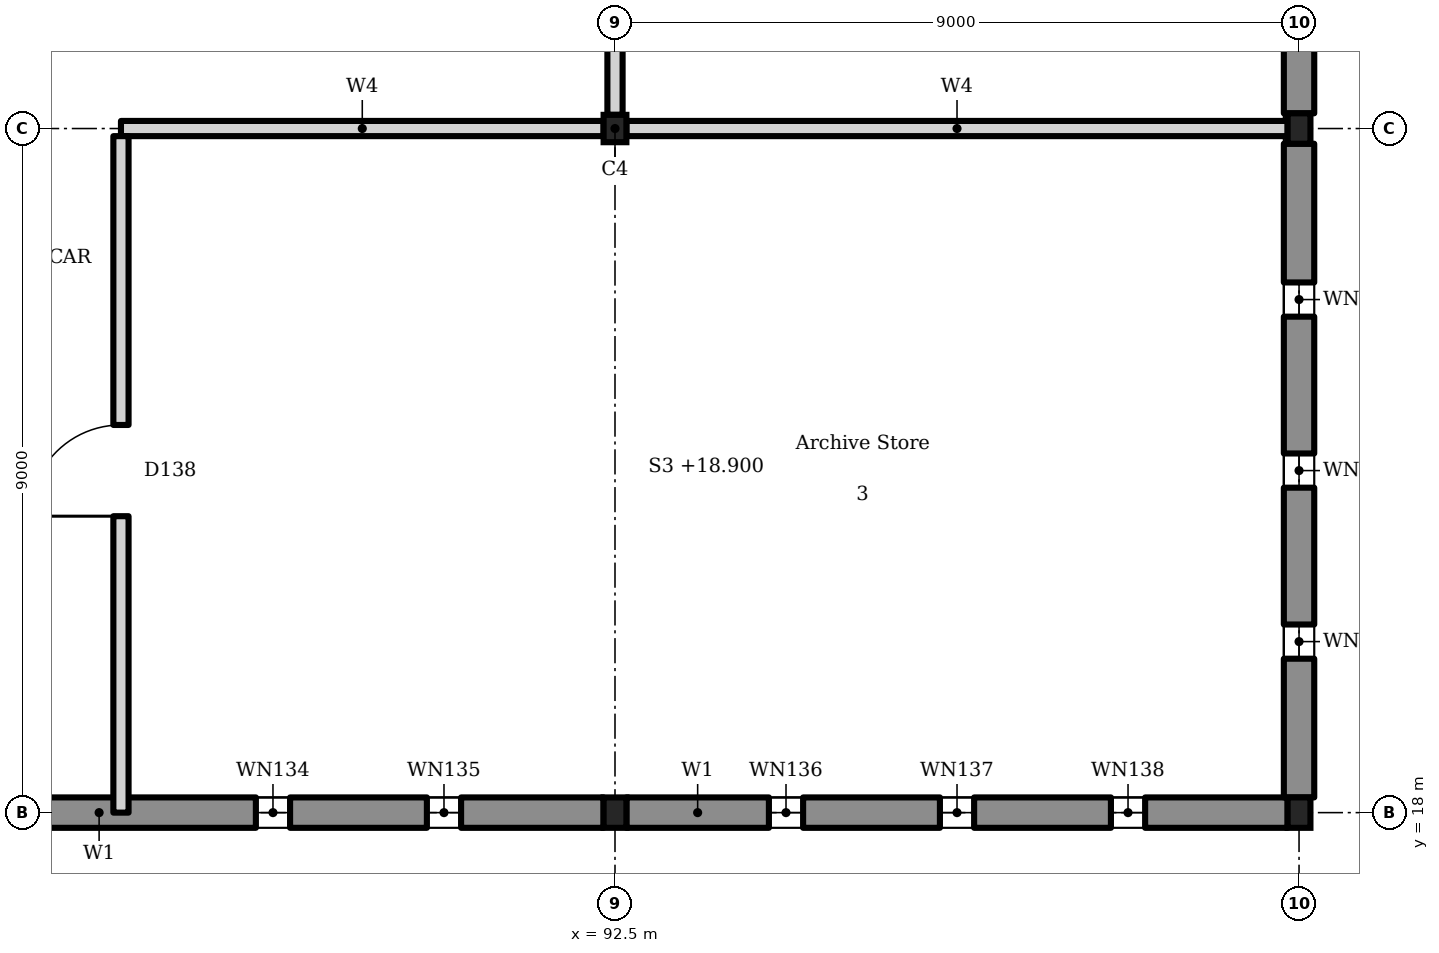
"""IFC4 building model, lengths in metres.
Left out: names, types, materials, properties, quantities, classifications, styles, units other than length and angle.
Written with IfcOpenShell. Run it as: python <this file> out.ifc"""

import sys

from ifc_helpers import new_model, si_unit, direction, frame, frame_2d, origin, origin_2d, place, context, subcontext, project, spatial, rectangle, i_section, extrude, element, fill, save


model = new_model("IFC4")
c1 = context("Model", 3, precision=1e-05, world=origin(), true_north=direction((0.0, 1.0)))
c2 = subcontext(c1, "Body", "Model", "MODEL_VIEW")
j1 = project(units=[si_unit("LENGTHUNIT", "METRE"), si_unit("PLANEANGLEUNIT", "RADIAN")], contexts=[c1])
p1 = place(None, origin())
s1 = spatial("IfcSite", under=j1, at=p1, CompositionType="ELEMENT")
p2 = place(p1, origin())
s2 = spatial("IfcBuilding", under=s1, at=p2, CompositionType="ELEMENT")
p3 = place(p2, frame((0.0, 0.0, 18.9)))
s3 = spatial("IfcBuildingStorey", under=s2, at=p3, CompositionType="ELEMENT", Elevation=18.9)
for number, where, z_axis, x_axis in (
    (1, (92.5, 18.0, 0.0), (0.0, 0.0, 1.0), (1.0, 0.0, 0.0)),
    (2, (101.5, 18.0, 0.0), (0.0, 0.0, 1.0), (1.0, 0.0, 0.0)),
):
    element("IfcColumn", number, at=place(p3, frame(where, z_axis=z_axis, x_axis=x_axis)), inside=s3, PredefinedType="COLUMN", context=c2, shape_type="SweptSolid", body=[
        extrude(i_section(OverallWidth=0.3, OverallDepth=0.4, WebThickness=0.013, FlangeThickness=0.024, FilletRadius=0.027, at=origin_2d()), origin(), (0.0, 0.0, 1.0), 4.5),
    ])
p4 = place(p3, frame((92.5, 27.0, 0.0), z_axis=(0.0, 0.0, 1.0), x_axis=(1.0, 0.0, 0.0)))
e3 = element("IfcColumn", 3, at=p4, inside=s3, PredefinedType="COLUMN", context=c2, shape_type="SweptSolid", body=[
    extrude(i_section(OverallWidth=0.3, OverallDepth=0.36, WebThickness=0.012, FlangeThickness=0.022, FilletRadius=0.027, at=origin_2d()), origin(), (0.0, 0.0, 1.0), 4.5),
])
p5 = place(p3, frame((101.5, 27.0, 0.0), z_axis=(0.0, 0.0, 1.0), x_axis=(1.0, 0.0, 0.0)))
e4 = element("IfcColumn", 4, at=p5, inside=s3, PredefinedType="COLUMN", context=c2, shape_type="SweptSolid", body=[
    extrude(i_section(OverallWidth=0.3, OverallDepth=0.4, WebThickness=0.013, FlangeThickness=0.024, FilletRadius=0.027, at=origin_2d()), origin(), (0.0, 0.0, 1.0), 4.5),
])
p6 = place(p3, frame((83.65, 18.0, 0.0), z_axis=(0.0, 0.0, 1.0), x_axis=(1.0, 0.0, 0.0)))
e5 = element("IfcWall", 5, at=p6, inside=s3, PredefinedType="SOLIDWALL", context=c2, shape_type="SweptSolid", body=[
    extrude(rectangle(XDim=8.7, YDim=0.4, at=frame_2d((4.35, 0.0))), origin(), (0.0, 0.0, 1.0), 4.5),
])
p7 = place(p6, frame((4.125, 0.0, 0.9)))
e6 = element("IfcOpeningElement", 6, at=p7, cuts=e5, PredefinedType="OPENING", context=c2, shape_type="SweptSolid", body=[
    extrude(rectangle(XDim=0.45, YDim=2.6, at=frame_2d((0.225, 1.3))), frame((0.0, 0.21, 0.0), z_axis=(0.0, -1.0, 0.0), x_axis=(1.0, 0.0, 0.0)), (0.0, 0.0, 1.0), 0.42),
])
p8 = place(p6, frame((6.375, 0.0, 0.9)))
e7 = element("IfcOpeningElement", 7, at=p8, cuts=e5, PredefinedType="OPENING", context=c2, shape_type="SweptSolid", body=[
    extrude(rectangle(XDim=0.45, YDim=2.6, at=frame_2d((0.225, 1.3))), frame((0.0, 0.21, 0.0), z_axis=(0.0, -1.0, 0.0), x_axis=(1.0, 0.0, 0.0)), (0.0, 0.0, 1.0), 0.42),
])
p9 = place(p3, frame((92.65, 18.0, 0.0), z_axis=(0.0, 0.0, 1.0), x_axis=(1.0, 0.0, 0.0)))
e8 = element("IfcWall", 8, at=p9, inside=s3, PredefinedType="SOLIDWALL", context=c2, shape_type="SweptSolid", body=[
    extrude(rectangle(XDim=8.7, YDim=0.4, at=frame_2d((4.35, 0.0))), origin(), (0.0, 0.0, 1.0), 4.5),
])
p10 = place(p9, frame((1.875, 0.0, 0.9)))
e9 = element("IfcOpeningElement", 9, at=p10, cuts=e8, PredefinedType="OPENING", context=c2, shape_type="SweptSolid", body=[
    extrude(rectangle(XDim=0.45, YDim=2.6, at=frame_2d((0.225, 1.3))), frame((0.0, 0.21, 0.0), z_axis=(0.0, -1.0, 0.0), x_axis=(1.0, 0.0, 0.0)), (0.0, 0.0, 1.0), 0.42),
])
p11 = place(p9, frame((4.125, 0.0, 0.9)))
e10 = element("IfcOpeningElement", 10, at=p11, cuts=e8, PredefinedType="OPENING", context=c2, shape_type="SweptSolid", body=[
    extrude(rectangle(XDim=0.45, YDim=2.6, at=frame_2d((0.225, 1.3))), frame((0.0, 0.21, 0.0), z_axis=(0.0, -1.0, 0.0), x_axis=(1.0, 0.0, 0.0)), (0.0, 0.0, 1.0), 0.42),
])
p12 = place(p9, frame((6.375, 0.0, 0.9)))
e11 = element("IfcOpeningElement", 11, at=p12, cuts=e8, PredefinedType="OPENING", context=c2, shape_type="SweptSolid", body=[
    extrude(rectangle(XDim=0.45, YDim=2.6, at=frame_2d((0.225, 1.3))), frame((0.0, 0.21, 0.0), z_axis=(0.0, -1.0, 0.0), x_axis=(1.0, 0.0, 0.0)), (0.0, 0.0, 1.0), 0.42),
])
p13 = place(p3, frame((101.5, 18.2, 0.0), z_axis=(0.0, 0.0, 1.0), x_axis=(0.0, 1.0, 0.0)))
e12 = element("IfcWall", 12, at=p13, inside=s3, PredefinedType="SOLIDWALL", context=c2, shape_type="SweptSolid", body=[
    extrude(rectangle(XDim=8.6, YDim=0.4, at=frame_2d((4.3, 0.0))), origin(), (0.0, 0.0, 1.0), 4.5),
])
p14 = place(p13, frame((1.825, 0.0, 0.9)))
e13 = element("IfcOpeningElement", 13, at=p14, cuts=e12, PredefinedType="OPENING", context=c2, shape_type="SweptSolid", body=[
    extrude(rectangle(XDim=0.45, YDim=2.6, at=frame_2d((0.225, 1.3))), frame((0.0, 0.21, 0.0), z_axis=(0.0, -1.0, 0.0), x_axis=(1.0, 0.0, 0.0)), (0.0, 0.0, 1.0), 0.42),
])
p15 = place(p13, frame((4.075, 0.0, 0.9)))
e14 = element("IfcOpeningElement", 14, at=p15, cuts=e12, PredefinedType="OPENING", context=c2, shape_type="SweptSolid", body=[
    extrude(rectangle(XDim=0.45, YDim=2.6, at=frame_2d((0.225, 1.3))), frame((0.0, 0.21, 0.0), z_axis=(0.0, -1.0, 0.0), x_axis=(1.0, 0.0, 0.0)), (0.0, 0.0, 1.0), 0.42),
])
p16 = place(p13, frame((6.325, 0.0, 0.9)))
e15 = element("IfcOpeningElement", 15, at=p16, cuts=e12, PredefinedType="OPENING", context=c2, shape_type="SweptSolid", body=[
    extrude(rectangle(XDim=0.45, YDim=2.6, at=frame_2d((0.225, 1.3))), frame((0.0, 0.21, 0.0), z_axis=(0.0, -1.0, 0.0), x_axis=(1.0, 0.0, 0.0)), (0.0, 0.0, 1.0), 0.42),
])
p17 = place(p3, frame((101.5, 27.2, 0.0), z_axis=(0.0, 0.0, 1.0), x_axis=(0.0, 1.0, 0.0)))
e16 = element("IfcWall", 16, at=p17, inside=s3, PredefinedType="SOLIDWALL", context=c2, shape_type="SweptSolid", body=[
    extrude(rectangle(XDim=8.6, YDim=0.4, at=frame_2d((4.3, 0.0))), origin(), (0.0, 0.0, 1.0), 4.5),
])
p18 = place(p3, frame((86.0, 27.0, 0.0), z_axis=(0.0, 0.0, 1.0), x_axis=(1.0, 0.0, 0.0)))
e17 = element("IfcWall", 17, at=p18, inside=s3, PredefinedType="SOLIDWALL", context=c2, shape_type="SweptSolid", body=[
    extrude(rectangle(XDim=6.35, YDim=0.2, at=frame_2d((3.175, 0.0))), origin(), (0.0, 0.0, 1.0), 3.6),
])
p19 = place(p3, frame((92.65, 27.0, 0.0), z_axis=(0.0, 0.0, 1.0), x_axis=(1.0, 0.0, 0.0)))
e18 = element("IfcWall", 18, at=p19, inside=s3, PredefinedType="SOLIDWALL", context=c2, shape_type="SweptSolid", body=[
    extrude(rectangle(XDim=8.7, YDim=0.2, at=frame_2d((4.35, 0.0))), origin(), (0.0, 0.0, 1.0), 3.6),
])
p20 = place(p3, frame((86.0, 18.0, 0.0), z_axis=(0.0, 0.0, 1.0), x_axis=(0.0, 1.0, 0.0)))
e19 = element("IfcWall", 19, at=p20, inside=s3, PredefinedType="SOLIDWALL", context=c2, shape_type="SweptSolid", body=[
    extrude(rectangle(XDim=8.9, YDim=0.2, at=frame_2d((4.45, 0.0))), origin(), (0.0, 0.0, 1.0), 3.6),
])
p21 = place(p20, frame((3.9, 0.0, 0.0)))
e20 = element("IfcOpeningElement", 20, at=p21, cuts=e19, PredefinedType="OPENING", context=c2, shape_type="SweptSolid", body=[
    extrude(rectangle(XDim=1.2, YDim=2.1, at=frame_2d((0.6, 1.05))), frame((0.0, 0.11, 0.0), z_axis=(0.0, -1.0, 0.0), x_axis=(1.0, 0.0, 0.0)), (0.0, 0.0, 1.0), 0.22),
])
p22 = place(p3, frame((92.5, 27.18, 0.0), z_axis=(0.0, 0.0, 1.0), x_axis=(0.0, 1.0, 0.0)))
e21 = element("IfcWall", 21, at=p22, inside=s3, PredefinedType="SOLIDWALL", context=c2, shape_type="SweptSolid", body=[
    extrude(rectangle(XDim=4.22, YDim=0.2, at=frame_2d((2.11, 0.0))), origin(), (0.0, 0.0, 1.0), 3.6),
])
p23 = place(p22, frame((1.47, 0.0, 0.0)))
e22 = element("IfcOpeningElement", 22, at=p23, cuts=e21, PredefinedType="OPENING", context=c2, shape_type="SweptSolid", body=[
    extrude(rectangle(XDim=1.2, YDim=2.1, at=frame_2d((0.6, 1.05))), frame((0.0, 0.11, 0.0), z_axis=(0.0, -1.0, 0.0), x_axis=(1.0, 0.0, 0.0)), (0.0, 0.0, 1.0), 0.22),
])
p24 = place(p7, origin())
e23 = element("IfcWindow", 23, at=p24, inside=s3, PartitioningType="SINGLE_PANEL", PredefinedType="WINDOW", context=c2, shape_type="SweptSolid", body=[
    extrude(rectangle(XDim=0.45, YDim=2.6, at=frame_2d((0.225, 1.3))), frame((0.0, 0.03, 0.0), z_axis=(0.0, -1.0, 0.0), x_axis=(1.0, 0.0, 0.0)), (0.0, 0.0, 1.0), 0.06),
])
fill(e6, e23)
p25 = place(p8, origin())
e24 = element("IfcWindow", 24, at=p25, inside=s3, PartitioningType="SINGLE_PANEL", PredefinedType="WINDOW", context=c2, shape_type="SweptSolid", body=[
    extrude(rectangle(XDim=0.45, YDim=2.6, at=frame_2d((0.225, 1.3))), frame((0.0, 0.03, 0.0), z_axis=(0.0, -1.0, 0.0), x_axis=(1.0, 0.0, 0.0)), (0.0, 0.0, 1.0), 0.06),
])
fill(e7, e24)
p26 = place(p10, origin())
e25 = element("IfcWindow", 25, at=p26, inside=s3, PartitioningType="SINGLE_PANEL", PredefinedType="WINDOW", context=c2, shape_type="SweptSolid", body=[
    extrude(rectangle(XDim=0.45, YDim=2.6, at=frame_2d((0.225, 1.3))), frame((0.0, 0.03, 0.0), z_axis=(0.0, -1.0, 0.0), x_axis=(1.0, 0.0, 0.0)), (0.0, 0.0, 1.0), 0.06),
])
fill(e9, e25)
p27 = place(p11, origin())
e26 = element("IfcWindow", 26, at=p27, inside=s3, PartitioningType="SINGLE_PANEL", PredefinedType="WINDOW", context=c2, shape_type="SweptSolid", body=[
    extrude(rectangle(XDim=0.45, YDim=2.6, at=frame_2d((0.225, 1.3))), frame((0.0, 0.03, 0.0), z_axis=(0.0, -1.0, 0.0), x_axis=(1.0, 0.0, 0.0)), (0.0, 0.0, 1.0), 0.06),
])
fill(e10, e26)
p28 = place(p12, origin())
e27 = element("IfcWindow", 27, at=p28, inside=s3, PartitioningType="SINGLE_PANEL", PredefinedType="WINDOW", context=c2, shape_type="SweptSolid", body=[
    extrude(rectangle(XDim=0.45, YDim=2.6, at=frame_2d((0.225, 1.3))), frame((0.0, 0.03, 0.0), z_axis=(0.0, -1.0, 0.0), x_axis=(1.0, 0.0, 0.0)), (0.0, 0.0, 1.0), 0.06),
])
fill(e11, e27)
p29 = place(p14, origin())
e28 = element("IfcWindow", 28, at=p29, inside=s3, PartitioningType="SINGLE_PANEL", PredefinedType="WINDOW", context=c2, shape_type="SweptSolid", body=[
    extrude(rectangle(XDim=0.45, YDim=2.6, at=frame_2d((0.225, 1.3))), frame((0.0, 0.03, 0.0), z_axis=(0.0, -1.0, 0.0), x_axis=(1.0, 0.0, 0.0)), (0.0, 0.0, 1.0), 0.06),
])
fill(e13, e28)
p30 = place(p15, origin())
e29 = element("IfcWindow", 29, at=p30, inside=s3, PartitioningType="SINGLE_PANEL", PredefinedType="WINDOW", context=c2, shape_type="SweptSolid", body=[
    extrude(rectangle(XDim=0.45, YDim=2.6, at=frame_2d((0.225, 1.3))), frame((0.0, 0.03, 0.0), z_axis=(0.0, -1.0, 0.0), x_axis=(1.0, 0.0, 0.0)), (0.0, 0.0, 1.0), 0.06),
])
fill(e14, e29)
p31 = place(p16, origin())
e30 = element("IfcWindow", 30, at=p31, inside=s3, PartitioningType="SINGLE_PANEL", PredefinedType="WINDOW", context=c2, shape_type="SweptSolid", body=[
    extrude(rectangle(XDim=0.45, YDim=2.6, at=frame_2d((0.225, 1.3))), frame((0.0, 0.03, 0.0), z_axis=(0.0, -1.0, 0.0), x_axis=(1.0, 0.0, 0.0)), (0.0, 0.0, 1.0), 0.06),
])
fill(e15, e30)
p32 = place(p21, origin())
e31 = element("IfcDoor", 31, at=p32, inside=s3, OperationType="DOUBLE_DOOR_SINGLE_SWING", PredefinedType="DOOR", context=c2, shape_type="SweptSolid", body=[
    extrude(rectangle(XDim=1.2, YDim=2.1, at=frame_2d((0.6, 1.05))), frame((0.0, 0.025, 0.0), z_axis=(0.0, -1.0, 0.0), x_axis=(1.0, 0.0, 0.0)), (0.0, 0.0, 1.0), 0.05),
])
fill(e20, e31)
save(model, sys.argv[1])
